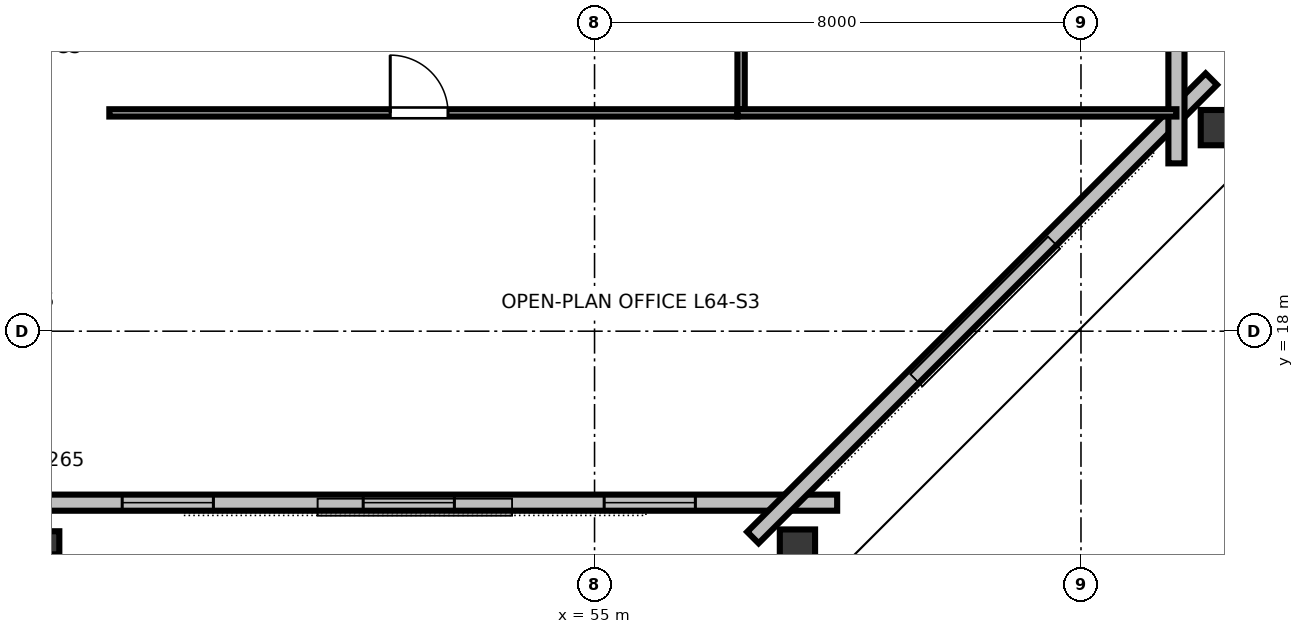
"""IFC4 building model, lengths in metres.
Left out: names, types, materials, properties, quantities, classifications, styles, units other than length and angle.
Written with IfcOpenShell. Run it as: python <this file> out.ifc"""

import sys

from ifc_helpers import new_model, si_unit, direction, frame, frame_2d, origin, origin_2d, place, context, subcontext, project, spatial, rectangle, hollow_rectangle, i_section, extrude, element, fill, save


model = new_model("IFC4")
c1 = context("Model", 3, precision=1e-05, world=origin(), true_north=direction((0.0, 1.0)))
c2 = subcontext(c1, "Body", "Model", "MODEL_VIEW")
j1 = project(units=[si_unit("LENGTHUNIT", "METRE"), si_unit("PLANEANGLEUNIT", "RADIAN")], contexts=[c1])
p1 = place(None, origin())
s1 = spatial("IfcSite", under=j1, at=p1, CompositionType="ELEMENT")
p2 = place(p1, origin())
s2 = spatial("IfcBuilding", under=s1, at=p2, CompositionType="ELEMENT")
p3 = place(p2, frame((0.0, 0.0, 243.0)))
s3 = spatial("IfcBuildingStorey", under=s2, at=p3, CompositionType="ELEMENT", Elevation=243.0)
p4 = place(p3, frame((46.0, 14.52, 0.0), z_axis=(0.0, 0.0, 1.0), x_axis=(1.0, 0.0, 0.0)))
e1 = element("IfcColumn", 1, at=p4, inside=s3, PredefinedType="COLUMN", context=c2, shape_type="SweptSolid", body=[
    extrude(i_section(OverallWidth=0.395, OverallDepth=0.38, WebThickness=0.019, FlangeThickness=0.03, FilletRadius=0.025, at=origin_2d()), origin(), (0.0, 0.0, 1.0), 3.373),
])
for number, where, z_axis, x_axis in (
    (2, (58.337, 14.39, 0.0), (0.0, 0.0, 1.0), (1.0, 0.0, 0.0)),
    (3, (65.32, 21.348, 0.0), (0.0, 0.0, 1.0), (0.0, 1.0, 0.0)),
):
    element("IfcColumn", number, at=place(p3, frame(where, z_axis=z_axis, x_axis=x_axis)), inside=s3, PredefinedType="COLUMN", context=c2, shape_type="SweptSolid", body=[
        extrude(hollow_rectangle(XDim=0.58, YDim=0.7, WallThickness=0.032, at=origin_2d()), origin(), (0.0, 0.0, 1.0), 3.373),
    ])
p5 = place(p3, frame((33.01, 15.18, 0.0), z_axis=(0.0, 0.0, 1.0), x_axis=(1.0, 0.0, 0.0)))
e4 = element("IfcWall", 4, at=p5, inside=s3, PredefinedType="STANDARD", context=c2, shape_type="SweptSolid", body=[
    extrude(rectangle(XDim=25.98, YDim=0.265, at=frame_2d((12.99, 0.0))), origin(), (0.0, 0.0, 1.0), 3.375),
])
p6 = place(p5, frame((2.332, 0.0, 0.85)))
e5 = element("IfcOpeningElement", 5, at=p6, cuts=e4, PredefinedType="OPENING", context=c2, shape_type="SweptSolid", body=[
    extrude(rectangle(XDim=1.5, YDim=1.85, at=frame_2d((0.75, 0.925))), frame((0.0, 0.142, 0.0), z_axis=(0.0, -1.0, 0.0), x_axis=(1.0, 0.0, 0.0)), (0.0, 0.0, 1.0), 0.285),
])
p7 = place(p5, frame((6.295, 0.0, 0.85)))
e6 = element("IfcOpeningElement", 6, at=p7, cuts=e4, PredefinedType="OPENING", context=c2, shape_type="SweptSolid", body=[
    extrude(rectangle(XDim=1.5, YDim=1.85, at=frame_2d((0.75, 0.925))), frame((0.0, 0.142, 0.0), z_axis=(0.0, -1.0, 0.0), x_axis=(1.0, 0.0, 0.0)), (0.0, 0.0, 1.0), 0.285),
])
p8 = place(p5, frame((10.258, 0.0, 0.85)))
e7 = element("IfcOpeningElement", 7, at=p8, cuts=e4, PredefinedType="OPENING", context=c2, shape_type="SweptSolid", body=[
    extrude(rectangle(XDim=1.5, YDim=1.85, at=frame_2d((0.75, 0.925))), frame((0.0, 0.142, 0.0), z_axis=(0.0, -1.0, 0.0), x_axis=(1.0, 0.0, 0.0)), (0.0, 0.0, 1.0), 0.285),
])
p9 = place(p5, frame((14.222, 0.0, 0.85)))
e8 = element("IfcOpeningElement", 8, at=p9, cuts=e4, PredefinedType="OPENING", context=c2, shape_type="SweptSolid", body=[
    extrude(rectangle(XDim=1.5, YDim=1.85, at=frame_2d((0.75, 0.925))), frame((0.0, 0.142, 0.0), z_axis=(0.0, -1.0, 0.0), x_axis=(1.0, 0.0, 0.0)), (0.0, 0.0, 1.0), 0.285),
])
p10 = place(p5, frame((18.185, 0.0, 0.85)))
e9 = element("IfcOpeningElement", 9, at=p10, cuts=e4, PredefinedType="OPENING", context=c2, shape_type="SweptSolid", body=[
    extrude(rectangle(XDim=1.5, YDim=1.85, at=frame_2d((0.75, 0.925))), frame((0.0, 0.142, 0.0), z_axis=(0.0, -1.0, 0.0), x_axis=(1.0, 0.0, 0.0)), (0.0, 0.0, 1.0), 0.285),
])
p11 = place(p5, frame((22.148, 0.0, 0.85)))
e10 = element("IfcOpeningElement", 10, at=p11, cuts=e4, PredefinedType="OPENING", context=c2, shape_type="SweptSolid", body=[
    extrude(rectangle(XDim=1.5, YDim=1.85, at=frame_2d((0.75, 0.925))), frame((0.0, 0.142, 0.0), z_axis=(0.0, -1.0, 0.0), x_axis=(1.0, 0.0, 0.0)), (0.0, 0.0, 1.0), 0.285),
])
p12 = place(p3, frame((57.604, 14.606, 0.0), z_axis=(0.0, 0.0, 1.0), x_axis=(0.707106781187, 0.707106781187, 0.0)))
e11 = element("IfcWall", 11, at=p12, inside=s3, PredefinedType="STANDARD", context=c2, shape_type="SweptSolid", body=[
    extrude(rectangle(XDim=10.662, YDim=0.265, at=frame_2d((5.331, 0.0))), origin(), (0.0, 0.0, 1.0), 3.375),
])
p13 = place(p3, frame((64.57, 20.76, 0.0), z_axis=(0.0, 0.0, 1.0), x_axis=(0.0, 1.0, 0.0)))
e12 = element("IfcWall", 12, at=p13, inside=s3, PredefinedType="STANDARD", context=c2, shape_type="SweptSolid", body=[
    extrude(rectangle(XDim=22.48, YDim=0.265, at=frame_2d((11.24, 0.0))), origin(), (0.0, 0.0, 1.0), 3.375),
])
p14 = place(p13, frame((2.378, 0.0, 0.85)))
e13 = element("IfcOpeningElement", 13, at=p14, cuts=e12, PredefinedType="OPENING", context=c2, shape_type="SweptSolid", body=[
    extrude(rectangle(XDim=1.5, YDim=1.85, at=frame_2d((0.75, 0.925))), frame((0.0, 0.142, 0.0), z_axis=(0.0, -1.0, 0.0), x_axis=(1.0, 0.0, 0.0)), (0.0, 0.0, 1.0), 0.285),
])
p15 = place(p13, frame((6.434, 0.0, 0.85)))
e14 = element("IfcOpeningElement", 14, at=p15, cuts=e12, PredefinedType="OPENING", context=c2, shape_type="SweptSolid", body=[
    extrude(rectangle(XDim=1.5, YDim=1.85, at=frame_2d((0.75, 0.925))), frame((0.0, 0.142, 0.0), z_axis=(0.0, -1.0, 0.0), x_axis=(1.0, 0.0, 0.0)), (0.0, 0.0, 1.0), 0.285),
])
p16 = place(p13, frame((14.546, 0.0, 0.85)))
e15 = element("IfcOpeningElement", 15, at=p16, cuts=e12, PredefinedType="OPENING", context=c2, shape_type="SweptSolid", body=[
    extrude(rectangle(XDim=1.5, YDim=1.85, at=frame_2d((0.75, 0.925))), frame((0.0, 0.142, 0.0), z_axis=(0.0, -1.0, 0.0), x_axis=(1.0, 0.0, 0.0)), (0.0, 0.0, 1.0), 0.285),
])
p17 = place(p13, frame((18.602, 0.0, 0.85)))
e16 = element("IfcOpeningElement", 16, at=p17, cuts=e12, PredefinedType="OPENING", context=c2, shape_type="SweptSolid", body=[
    extrude(rectangle(XDim=1.5, YDim=1.85, at=frame_2d((0.75, 0.925))), frame((0.0, 0.142, 0.0), z_axis=(0.0, -1.0, 0.0), x_axis=(1.0, 0.0, 0.0)), (0.0, 0.0, 1.0), 0.285),
])
p18 = place(p3, frame((47.02, 21.59, 0.0), z_axis=(0.0, 0.0, 1.0), x_axis=(1.0, 0.0, 0.0)))
e17 = element("IfcWall", 17, at=p18, inside=s3, PredefinedType="PARTITIONING", context=c2, shape_type="SweptSolid", body=[
    extrude(rectangle(XDim=10.33, YDim=0.12, at=frame_2d((5.165, 0.0))), origin(), (0.0, 0.0, 1.0), 2.655),
])
p19 = place(p18, frame((4.62, 0.0, 0.0)))
e18 = element("IfcOpeningElement", 18, at=p19, cuts=e17, PredefinedType="OPENING", context=c2, shape_type="SweptSolid", body=[
    extrude(rectangle(XDim=0.95, YDim=2.15, at=frame_2d((0.475, 1.075))), frame((0.0, 0.07, 0.0), z_axis=(0.0, -1.0, 0.0), x_axis=(1.0, 0.0, 0.0)), (0.0, 0.0, 1.0), 0.14),
])
p20 = place(p3, frame((57.41, 21.65, 0.0), z_axis=(0.0, 0.0, 1.0), x_axis=(0.0, 1.0, 0.0)))
e19 = element("IfcWall", 19, at=p20, inside=s3, PredefinedType="PARTITIONING", context=c2, shape_type="SweptSolid", body=[
    extrude(rectangle(XDim=20.7, YDim=0.12, at=frame_2d((10.35, 0.0))), origin(), (0.0, 0.0, 1.0), 2.655),
])
p21 = place(p20, frame((9.875, 0.0, 0.0)))
e20 = element("IfcOpeningElement", 20, at=p21, cuts=e19, PredefinedType="OPENING", context=c2, shape_type="SweptSolid", body=[
    extrude(rectangle(XDim=0.95, YDim=2.15, at=frame_2d((0.475, 1.075))), frame((0.0, 0.07, 0.0), z_axis=(0.0, -1.0, 0.0), x_axis=(1.0, 0.0, 0.0)), (0.0, 0.0, 1.0), 0.14),
])
p22 = place(p3, frame((57.35, 21.59, 0.0), z_axis=(0.0, 0.0, 1.0), x_axis=(1.0, 0.0, 0.0)))
e21 = element("IfcWall", 21, at=p22, inside=s3, PredefinedType="PARTITIONING", context=c2, shape_type="SweptSolid", body=[
    extrude(rectangle(XDim=7.22, YDim=0.12, at=frame_2d((3.61, 0.0))), origin(), (0.0, 0.0, 1.0), 2.655),
])
p23 = place(p9, origin())
e22 = element("IfcWindow", 22, at=p23, inside=s3, PartitioningType="SINGLE_PANEL", PredefinedType="WINDOW", context=c2, shape_type="SweptSolid", body=[
    extrude(rectangle(XDim=1.5, YDim=1.85, at=frame_2d((0.75, 0.925))), frame((0.0, 0.03, 0.0), z_axis=(0.0, -1.0, 0.0), x_axis=(1.0, 0.0, 0.0)), (0.0, 0.0, 1.0), 0.06),
])
fill(e8, e22)
p24 = place(p10, origin())
e23 = element("IfcWindow", 23, at=p24, inside=s3, PartitioningType="SINGLE_PANEL", PredefinedType="WINDOW", context=c2, shape_type="SweptSolid", body=[
    extrude(rectangle(XDim=1.5, YDim=1.85, at=frame_2d((0.75, 0.925))), frame((0.0, 0.03, 0.0), z_axis=(0.0, -1.0, 0.0), x_axis=(1.0, 0.0, 0.0)), (0.0, 0.0, 1.0), 0.06),
])
fill(e9, e23)
p25 = place(p11, origin())
e24 = element("IfcWindow", 24, at=p25, inside=s3, PartitioningType="SINGLE_PANEL", PredefinedType="WINDOW", context=c2, shape_type="SweptSolid", body=[
    extrude(rectangle(XDim=1.5, YDim=1.85, at=frame_2d((0.75, 0.925))), frame((0.0, 0.03, 0.0), z_axis=(0.0, -1.0, 0.0), x_axis=(1.0, 0.0, 0.0)), (0.0, 0.0, 1.0), 0.06),
])
fill(e10, e24)
p26 = place(p19, origin())
e25 = element("IfcDoor", 25, at=p26, inside=s3, OperationType="SINGLE_SWING_LEFT", PredefinedType="DOOR", context=c2, shape_type="SweptSolid", body=[
    extrude(rectangle(XDim=0.95, YDim=2.15, at=frame_2d((0.475, 1.075))), frame((0.0, 0.025, 0.0), z_axis=(0.0, -1.0, 0.0), x_axis=(1.0, 0.0, 0.0)), (0.0, 0.0, 1.0), 0.05),
])
fill(e18, e25)
save(model, sys.argv[1])
